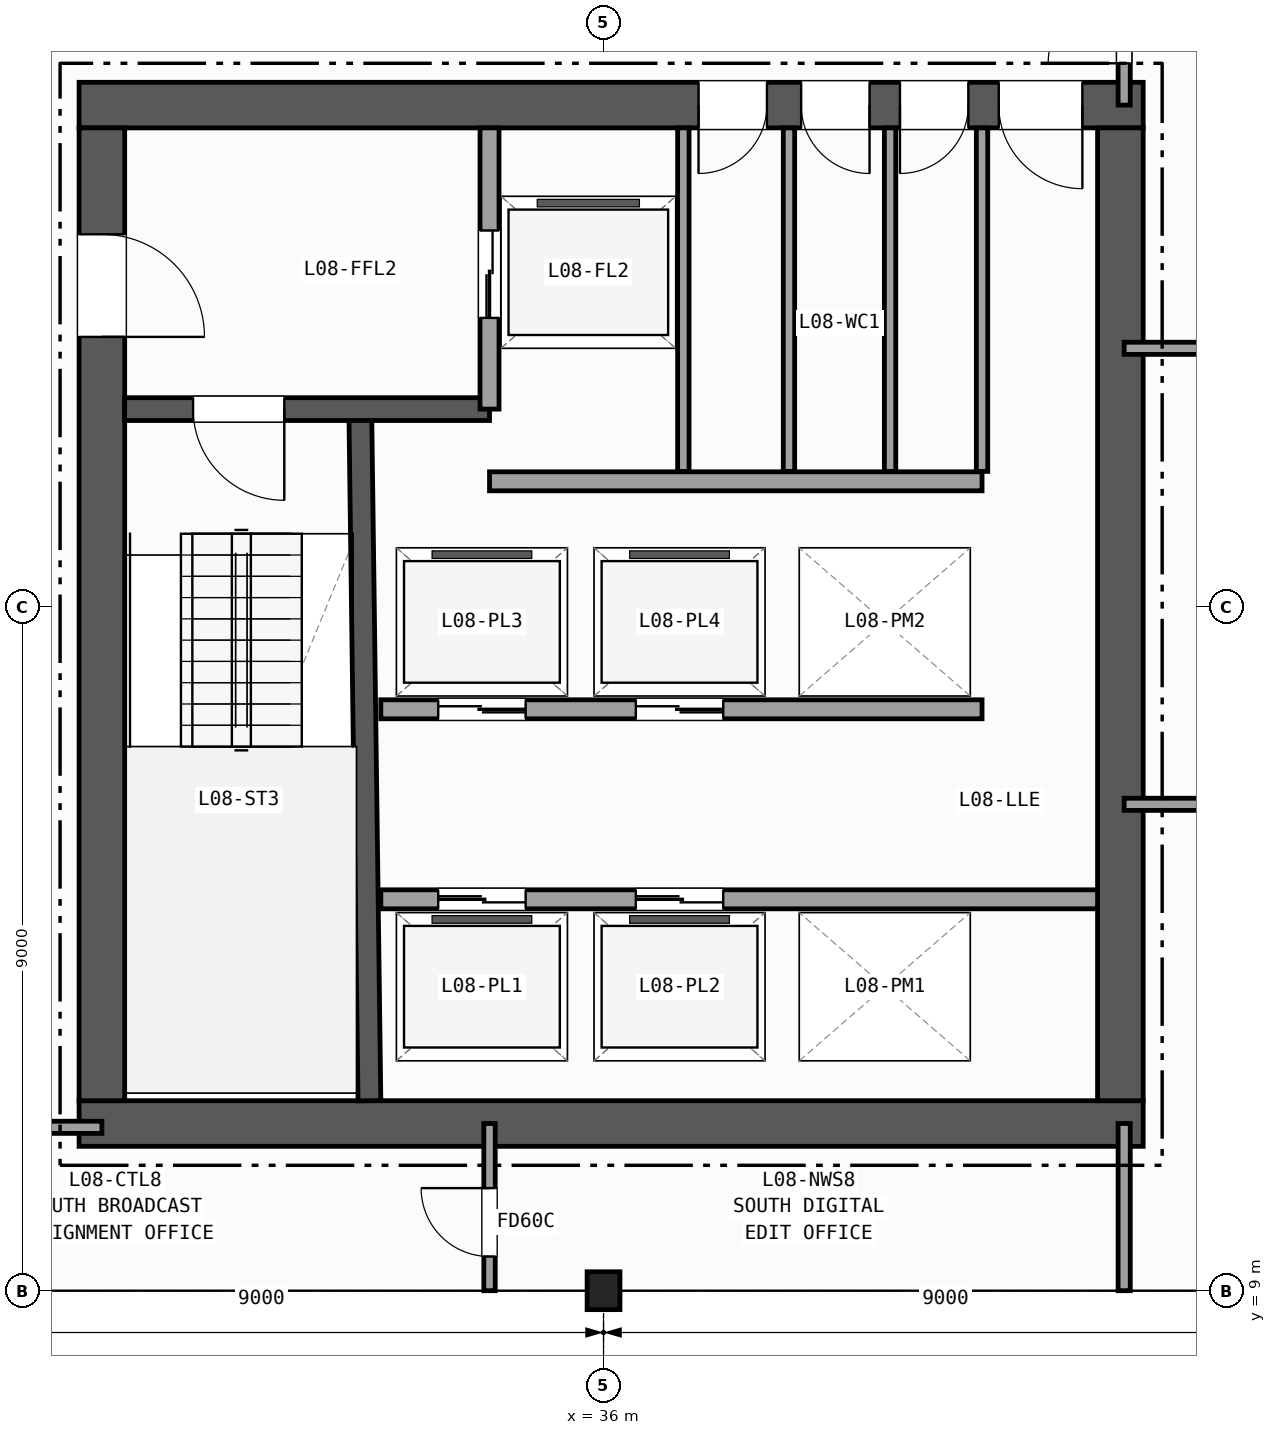
"""IFC4 building model, lengths in metres.
Left out: names, types, materials, properties, quantities, classifications, styles, units other than length and angle.
Written with IfcOpenShell. Run it as: python <this file> out.ifc"""

import sys

from ifc_helpers import new_model, si_unit, direction, frame, frame_2d, origin, origin_2d, place, context, subcontext, project, spatial, rectangle, i_section, extrude, element, fill, save


model = new_model("IFC4")
c1 = context("Model", 3, precision=1e-05, world=origin(), true_north=direction((0.0, 1.0)))
c2 = subcontext(c1, "Body", "Model", "MODEL_VIEW")
j1 = project(units=[si_unit("LENGTHUNIT", "METRE"), si_unit("PLANEANGLEUNIT", "RADIAN")], contexts=[c1])
p1 = place(None, origin())
s1 = spatial("IfcSite", under=j1, at=p1, CompositionType="ELEMENT")
p2 = place(p1, origin())
s2 = spatial("IfcBuilding", under=s1, at=p2, CompositionType="ELEMENT")
p3 = place(p2, frame((0.0, 0.0, 39.7)))
s3 = spatial("IfcBuildingStorey", under=s2, at=p3, CompositionType="ELEMENT", Elevation=39.7)
p4 = place(p3, frame((36.0, 9.0, 0.0), z_axis=(0.0, 0.0, 1.0), x_axis=(1.0, 0.0, 0.0)))
e1 = element("IfcColumn", 1, at=p4, inside=s3, PredefinedType="COLUMN", context=c2, shape_type="SweptSolid", body=[
    extrude(i_section(OverallWidth=0.432, OverallDepth=0.498, WebThickness=0.056, FlangeThickness=0.089, FilletRadius=0.015, at=origin_2d()), origin(), (0.0, 0.0, 1.0), 3.7),
])
p5 = place(p3, frame((29.1, 11.2, 0.0), z_axis=(0.0, 0.0, 1.0), x_axis=(1.0, 0.0, 0.0)))
e2 = element("IfcWall", 2, at=p5, inside=s3, PredefinedType="SHEAR", context=c2, shape_type="SweptSolid", body=[
    extrude(rectangle(XDim=14.0, YDim=0.6, at=frame_2d((7.0, 0.0))), origin(), (0.0, 0.0, 1.0), 3.42),
])
p6 = place(p3, frame((43.1, 24.6, 0.0), z_axis=(0.0, 0.0, 1.0), x_axis=(-1.0, 0.0, 0.0)))
e3 = element("IfcWall", 3, at=p6, inside=s3, PredefinedType="SHEAR", context=c2, shape_type="SweptSolid", body=[
    extrude(rectangle(XDim=14.0, YDim=0.6, at=frame_2d((7.0, 0.0))), origin(), (0.0, 0.0, 1.0), 3.42),
])
p7 = place(p6, frame((0.8, 0.0, 0.0)))
e4 = element("IfcOpeningElement", 4, at=p7, cuts=e3, PredefinedType="OPENING", context=c2, shape_type="SweptSolid", body=[
    extrude(rectangle(XDim=1.1, YDim=2.15, at=frame_2d((0.55, 1.075))), frame((0.0, 0.31, 0.0), z_axis=(0.0, -1.0, 0.0), x_axis=(1.0, 0.0, 0.0)), (0.0, 0.0, 1.0), 0.62),
])
p8 = place(p6, frame((2.3, 0.0, 0.0)))
e5 = element("IfcOpeningElement", 5, at=p8, cuts=e3, PredefinedType="OPENING", context=c2, shape_type="SweptSolid", body=[
    extrude(rectangle(XDim=0.9, YDim=2.1, at=frame_2d((0.45, 1.05))), frame((0.0, 0.31, 0.0), z_axis=(0.0, -1.0, 0.0), x_axis=(1.0, 0.0, 0.0)), (0.0, 0.0, 1.0), 0.62),
])
p9 = place(p6, frame((3.6, 0.0, 0.0)))
e6 = element("IfcOpeningElement", 6, at=p9, cuts=e3, PredefinedType="OPENING", context=c2, shape_type="SweptSolid", body=[
    extrude(rectangle(XDim=0.9, YDim=2.1, at=frame_2d((0.45, 1.05))), frame((0.0, 0.31, 0.0), z_axis=(0.0, -1.0, 0.0), x_axis=(1.0, 0.0, 0.0)), (0.0, 0.0, 1.0), 0.62),
])
p10 = place(p6, frame((4.95, 0.0, 0.0)))
e7 = element("IfcOpeningElement", 7, at=p10, cuts=e3, PredefinedType="OPENING", context=c2, shape_type="SweptSolid", body=[
    extrude(rectangle(XDim=0.9, YDim=2.1, at=frame_2d((0.45, 1.05))), frame((0.0, 0.31, 0.0), z_axis=(0.0, -1.0, 0.0), x_axis=(1.0, 0.0, 0.0)), (0.0, 0.0, 1.0), 0.62),
])
p11 = place(p3, frame((29.4, 24.3, 0.0), z_axis=(0.0, 0.0, 1.0), x_axis=(0.0, -1.0, 0.0)))
e8 = element("IfcWall", 8, at=p11, inside=s3, PredefinedType="SHEAR", context=c2, shape_type="SweptSolid", body=[
    extrude(rectangle(XDim=12.8, YDim=0.6, at=frame_2d((6.4, 0.0))), origin(), (0.0, 0.0, 1.0), 3.42),
])
p12 = place(p11, frame((1.4, 0.0, 0.0)))
e9 = element("IfcOpeningElement", 9, at=p12, cuts=e8, PredefinedType="OPENING", context=c2, shape_type="SweptSolid", body=[
    extrude(rectangle(XDim=1.35, YDim=2.15, at=frame_2d((0.675, 1.075))), frame((0.0, 0.31, 0.0), z_axis=(0.0, -1.0, 0.0), x_axis=(1.0, 0.0, 0.0)), (0.0, 0.0, 1.0), 0.62),
])
p13 = place(p3, frame((42.8, 11.5, 0.0), z_axis=(0.0, 0.0, 1.0), x_axis=(0.0, 1.0, 0.0)))
e10 = element("IfcWall", 10, at=p13, inside=s3, PredefinedType="SHEAR", context=c2, shape_type="SweptSolid", body=[
    extrude(rectangle(XDim=12.8, YDim=0.6, at=frame_2d((6.4, 0.0))), origin(), (0.0, 0.0, 1.0), 3.42),
])
p14 = place(p3, frame((32.92, 11.5, 0.0), z_axis=(0.0, 0.0, 1.0), x_axis=(-0.013244407292, 0.999912288991, 0.0)))
e11 = element("IfcWall", 11, at=p14, inside=s3, PredefinedType="SHEAR", context=c2, shape_type="SweptSolid", body=[
    extrude(rectangle(XDim=9.051, YDim=0.3, at=frame_2d((4.525, 0.0))), origin(), (0.0, 0.0, 1.0), 3.42),
])
p15 = place(p3, frame((34.5, 20.6, 0.0), z_axis=(0.0, 0.0, 1.0), x_axis=(-1.0, 0.0, 0.0)))
e12 = element("IfcWall", 12, at=p15, inside=s3, PredefinedType="SHEAR", context=c2, shape_type="SweptSolid", body=[
    extrude(rectangle(XDim=4.8, YDim=0.3, at=frame_2d((2.4, 0.0))), origin(), (0.0, 0.0, 1.0), 3.42),
])
p16 = place(p15, frame((2.7, 0.0, 0.0)))
e13 = element("IfcOpeningElement", 13, at=p16, cuts=e12, PredefinedType="OPENING", context=c2, shape_type="SweptSolid", body=[
    extrude(rectangle(XDim=1.2, YDim=2.15, at=frame_2d((0.6, 1.075))), frame((0.0, 0.16, 0.0), z_axis=(0.0, -1.0, 0.0), x_axis=(1.0, 0.0, 0.0)), (0.0, 0.0, 1.0), 0.32),
])
p17 = place(p3, frame((34.5, 20.6, 0.0), z_axis=(0.0, 0.0, 1.0), x_axis=(0.0, 1.0, 0.0)))
e14 = element("IfcWall", 14, at=p17, inside=s3, PredefinedType="PARTITIONING", context=c2, shape_type="SweptSolid", body=[
    extrude(rectangle(XDim=3.7, YDim=0.25, at=frame_2d((1.85, 0.0))), origin(), (0.0, 0.0, 1.0), 3.42),
])
p18 = place(p17, frame((1.2, 0.0, 0.0)))
e15 = element("IfcOpeningElement", 15, at=p18, cuts=e14, PredefinedType="OPENING", context=c2, shape_type="SweptSolid", body=[
    extrude(rectangle(XDim=1.15, YDim=2.15, at=frame_2d((0.575, 1.075))), frame((0.0, 0.135, 0.0), z_axis=(0.0, -1.0, 0.0), x_axis=(1.0, 0.0, 0.0)), (0.0, 0.0, 1.0), 0.27),
])
p19 = place(p3, frame((34.5, 19.65, 0.0), z_axis=(0.0, 0.0, 1.0), x_axis=(1.0, 0.0, 0.0)))
e16 = element("IfcWall", 16, at=p19, inside=s3, PredefinedType="PARTITIONING", context=c2, shape_type="SweptSolid", body=[
    extrude(rectangle(XDim=6.48, YDim=0.25, at=frame_2d((3.24, 0.0))), origin(), (0.0, 0.0, 1.0), 3.42),
])
p20 = place(p3, frame((33.07, 14.15, 0.0), z_axis=(0.0, 0.0, 1.0), x_axis=(1.0, 0.0, 0.0)))
e17 = element("IfcWall", 17, at=p20, inside=s3, PredefinedType="PARTITIONING", context=c2, shape_type="SweptSolid", body=[
    extrude(rectangle(XDim=9.43, YDim=0.25, at=frame_2d((4.715, 0.0))), origin(), (0.0, 0.0, 1.0), 3.42),
])
p21 = place(p20, frame((0.755, 0.0, 0.0)))
e18 = element("IfcOpeningElement", 18, at=p21, cuts=e17, PredefinedType="OPENING", context=c2, shape_type="SweptSolid", body=[
    extrude(rectangle(XDim=1.15, YDim=2.15, at=frame_2d((0.575, 1.075))), frame((0.0, 0.135, 0.0), z_axis=(0.0, -1.0, 0.0), x_axis=(1.0, 0.0, 0.0)), (0.0, 0.0, 1.0), 0.27),
])
p22 = place(p20, frame((3.355, 0.0, 0.0)))
e19 = element("IfcOpeningElement", 19, at=p22, cuts=e17, PredefinedType="OPENING", context=c2, shape_type="SweptSolid", body=[
    extrude(rectangle(XDim=1.15, YDim=2.15, at=frame_2d((0.575, 1.075))), frame((0.0, 0.135, 0.0), z_axis=(0.0, -1.0, 0.0), x_axis=(1.0, 0.0, 0.0)), (0.0, 0.0, 1.0), 0.27),
])
p23 = place(p3, frame((40.98, 16.65, 0.0), z_axis=(0.0, 0.0, 1.0), x_axis=(-1.0, 0.0, 0.0)))
e20 = element("IfcWall", 20, at=p23, inside=s3, PredefinedType="PARTITIONING", context=c2, shape_type="SweptSolid", body=[
    extrude(rectangle(XDim=7.91, YDim=0.25, at=frame_2d((3.955, 0.0))), origin(), (0.0, 0.0, 1.0), 3.42),
])
p24 = place(p23, frame((6.005, 0.0, 0.0)))
e21 = element("IfcOpeningElement", 21, at=p24, cuts=e20, PredefinedType="OPENING", context=c2, shape_type="SweptSolid", body=[
    extrude(rectangle(XDim=1.15, YDim=2.15, at=frame_2d((0.575, 1.075))), frame((0.0, 0.135, 0.0), z_axis=(0.0, -1.0, 0.0), x_axis=(1.0, 0.0, 0.0)), (0.0, 0.0, 1.0), 0.27),
])
p25 = place(p23, frame((3.405, 0.0, 0.0)))
e22 = element("IfcOpeningElement", 22, at=p25, cuts=e20, PredefinedType="OPENING", context=c2, shape_type="SweptSolid", body=[
    extrude(rectangle(XDim=1.15, YDim=2.15, at=frame_2d((0.575, 1.075))), frame((0.0, 0.135, 0.0), z_axis=(0.0, -1.0, 0.0), x_axis=(1.0, 0.0, 0.0)), (0.0, 0.0, 1.0), 0.27),
])
for number, where, z_axis, x_axis in (
    (23, (37.05, 19.78, 0.0), (0.0, 0.0, 1.0), (0.0, 1.0, 0.0)),
    (24, (38.44, 19.78, 0.0), (0.0, 0.0, 1.0), (0.0, 1.0, 0.0)),
    (25, (39.77, 19.78, 0.0), (0.0, 0.0, 1.0), (0.0, 1.0, 0.0)),
    (26, (40.98, 19.78, 0.0), (0.0, 0.0, 1.0), (0.0, 1.0, 0.0)),
):
    element("IfcWall", number, at=place(p3, frame(where, z_axis=z_axis, x_axis=x_axis)), inside=s3, PredefinedType="PARTITIONING", context=c2, shape_type="SweptSolid", body=[
        extrude(rectangle(XDim=4.52, YDim=0.15, at=frame_2d((2.26, 0.0))), origin(), (0.0, 0.0, 1.0), 3.42),
    ])
p26 = place(p3, frame((24.65, 11.15, 0.0), z_axis=(0.0, 0.0, 1.0), x_axis=(1.0, 0.0, 0.0)))
e27 = element("IfcWall", 27, at=p26, inside=s3, PredefinedType="PARTITIONING", context=c2, shape_type="SweptSolid", body=[
    extrude(rectangle(XDim=4.75, YDim=0.16, at=frame_2d((2.375, 0.0))), origin(), (0.0, 0.0, 1.0), 2.792),
])
p27 = place(p26, frame((1.2, 0.0, 0.0)))
e28 = element("IfcOpeningElement", 28, at=p27, cuts=e27, PredefinedType="OPENING", context=c2, shape_type="SweptSolid", body=[
    extrude(rectangle(XDim=0.86, YDim=2.05, at=frame_2d((0.43, 1.025))), frame((0.0, 0.09, 0.0), z_axis=(0.0, -1.0, 0.0), x_axis=(1.0, 0.0, 0.0)), (0.0, 0.0, 1.0), 0.18),
])
p28 = place(p3, frame((34.5, 9.0, 0.0), z_axis=(0.0, 0.0, 1.0), x_axis=(0.0, 1.0, 0.0)))
e29 = element("IfcWall", 29, at=p28, inside=s3, PredefinedType="PARTITIONING", context=c2, shape_type="SweptSolid", body=[
    extrude(rectangle(XDim=2.2, YDim=0.15, at=frame_2d((1.1, 0.0))), origin(), (0.0, 0.0, 1.0), 2.627),
])
p29 = place(p28, frame((0.45, 0.0, 0.0)))
e30 = element("IfcOpeningElement", 30, at=p29, cuts=e29, PredefinedType="OPENING", context=c2, shape_type="SweptSolid", body=[
    extrude(rectangle(XDim=0.9, YDim=2.1, at=frame_2d((0.45, 1.05))), frame((0.0, 0.085, 0.0), z_axis=(0.0, -1.0, 0.0), x_axis=(1.0, 0.0, 0.0)), (0.0, 0.0, 1.0), 0.17),
])
p30 = place(p3, frame((42.85, 9.0, 0.0), z_axis=(0.0, 0.0, 1.0), x_axis=(0.0, 1.0, 0.0)))
e31 = element("IfcWall", 31, at=p30, inside=s3, PredefinedType="PARTITIONING", context=c2, shape_type="SweptSolid", body=[
    extrude(rectangle(XDim=2.2, YDim=0.16, at=frame_2d((1.1, 0.0))), origin(), (0.0, 0.0, 1.0), 2.627),
])
p31 = place(p3, frame((42.85, 24.6, 0.0), z_axis=(0.0, 0.0, 1.0), x_axis=(0.0, 1.0, 0.0)))
e32 = element("IfcWall", 32, at=p31, inside=s3, PredefinedType="PARTITIONING", context=c2, shape_type="SweptSolid", body=[
    extrude(rectangle(XDim=2.4, YDim=0.16, at=frame_2d((1.2, 0.0))), origin(), (0.0, 0.0, 1.0), 2.627),
])
p32 = place(p31, frame((0.55, 0.0, 0.0)))
e33 = element("IfcOpeningElement", 33, at=p32, cuts=e32, PredefinedType="OPENING", context=c2, shape_type="SweptSolid", body=[
    extrude(rectangle(XDim=1.0, YDim=2.1, at=frame_2d((0.5, 1.05))), frame((0.0, 0.09, 0.0), z_axis=(0.0, -1.0, 0.0), x_axis=(1.0, 0.0, 0.0)), (0.0, 0.0, 1.0), 0.18),
])
p33 = place(p3, frame((42.85, 15.4, 0.0), z_axis=(0.0, 0.0, 1.0), x_axis=(1.0, 0.0, 0.0)))
e34 = element("IfcWall", 34, at=p33, inside=s3, PredefinedType="PARTITIONING", context=c2, shape_type="SweptSolid", body=[
    extrude(rectangle(XDim=20.582, YDim=0.16, at=frame_2d((10.291, 0.0))), origin(), (0.0, 0.0, 1.0), 3.42),
])
p34 = place(p33, frame((3.4, 0.0, 0.0)))
e35 = element("IfcOpeningElement", 35, at=p34, cuts=e34, PredefinedType="OPENING", context=c2, shape_type="SweptSolid", body=[
    extrude(rectangle(XDim=1.05, YDim=2.15, at=frame_2d((0.525, 1.075))), frame((0.0, 0.09, 0.0), z_axis=(0.0, -1.0, 0.0), x_axis=(1.0, 0.0, 0.0)), (0.0, 0.0, 1.0), 0.18),
])
p35 = place(p3, frame((42.85, 21.4, 0.0), z_axis=(0.0, 0.0, 1.0), x_axis=(1.0, 0.0, 0.0)))
e36 = element("IfcWall", 36, at=p35, inside=s3, PredefinedType="PARTITIONING", context=c2, shape_type="SweptSolid", body=[
    extrude(rectangle(XDim=20.5, YDim=0.16, at=frame_2d((10.25, 0.0))), origin(), (0.0, 0.0, 1.0), 3.42),
])
p36 = place(p35, frame((3.4, 0.0, 0.0)))
e37 = element("IfcOpeningElement", 37, at=p36, cuts=e36, PredefinedType="OPENING", context=c2, shape_type="SweptSolid", body=[
    extrude(rectangle(XDim=1.2, YDim=2.15, at=frame_2d((0.6, 1.075))), frame((0.0, 0.09, 0.0), z_axis=(0.0, -1.0, 0.0), x_axis=(1.0, 0.0, 0.0)), (0.0, 0.0, 1.0), 0.18),
])
p37 = place(p16, origin())
e38 = element("IfcDoor", 38, at=p37, inside=s3, OperationType="SINGLE_SWING_LEFT", PredefinedType="DOOR", context=c2, shape_type="SweptSolid", body=[
    extrude(rectangle(XDim=1.2, YDim=2.15, at=frame_2d((0.6, 1.075))), frame((0.0, 0.025, 0.0), z_axis=(0.0, -1.0, 0.0), x_axis=(1.0, 0.0, 0.0)), (0.0, 0.0, 1.0), 0.05),
])
fill(e13, e38)
p38 = place(p12, origin())
e39 = element("IfcDoor", 39, at=p38, inside=s3, OperationType="SINGLE_SWING_RIGHT", PredefinedType="DOOR", context=c2, shape_type="SweptSolid", body=[
    extrude(rectangle(XDim=1.35, YDim=2.15, at=frame_2d((0.675, 1.075))), frame((0.0, 0.025, 0.0), z_axis=(0.0, -1.0, 0.0), x_axis=(1.0, 0.0, 0.0)), (0.0, 0.0, 1.0), 0.05),
])
fill(e9, e39)
p39 = place(p7, origin())
e40 = element("IfcDoor", 40, at=p39, inside=s3, OperationType="SINGLE_SWING_LEFT", PredefinedType="DOOR", context=c2, shape_type="SweptSolid", body=[
    extrude(rectangle(XDim=1.1, YDim=2.15, at=frame_2d((0.55, 1.075))), frame((0.0, 0.025, 0.0), z_axis=(0.0, -1.0, 0.0), x_axis=(1.0, 0.0, 0.0)), (0.0, 0.0, 1.0), 0.05),
])
fill(e4, e40)
p40 = place(p8, origin())
e41 = element("IfcDoor", 41, at=p40, inside=s3, OperationType="SINGLE_SWING_RIGHT", PredefinedType="DOOR", context=c2, shape_type="SweptSolid", body=[
    extrude(rectangle(XDim=0.9, YDim=2.1, at=frame_2d((0.45, 1.05))), frame((0.0, 0.025, 0.0), z_axis=(0.0, -1.0, 0.0), x_axis=(1.0, 0.0, 0.0)), (0.0, 0.0, 1.0), 0.05),
])
fill(e5, e41)
p41 = place(p9, origin())
e42 = element("IfcDoor", 42, at=p41, inside=s3, OperationType="SINGLE_SWING_LEFT", PredefinedType="DOOR", context=c2, shape_type="SweptSolid", body=[
    extrude(rectangle(XDim=0.9, YDim=2.1, at=frame_2d((0.45, 1.05))), frame((0.0, 0.025, 0.0), z_axis=(0.0, -1.0, 0.0), x_axis=(1.0, 0.0, 0.0)), (0.0, 0.0, 1.0), 0.05),
])
fill(e6, e42)
p42 = place(p10, origin())
e43 = element("IfcDoor", 43, at=p42, inside=s3, OperationType="SINGLE_SWING_RIGHT", PredefinedType="DOOR", context=c2, shape_type="SweptSolid", body=[
    extrude(rectangle(XDim=0.9, YDim=2.1, at=frame_2d((0.45, 1.05))), frame((0.0, 0.025, 0.0), z_axis=(0.0, -1.0, 0.0), x_axis=(1.0, 0.0, 0.0)), (0.0, 0.0, 1.0), 0.05),
])
fill(e7, e43)
p43 = place(p18, origin())
e44 = element("IfcDoor", 44, at=p43, inside=s3, OperationType="DOUBLE_DOOR_SLIDING", PredefinedType="DOOR", context=c2, shape_type="SweptSolid", body=[
    extrude(rectangle(XDim=1.15, YDim=2.15, at=frame_2d((0.575, 1.075))), frame((0.0, 0.025, 0.0), z_axis=(0.0, -1.0, 0.0), x_axis=(1.0, 0.0, 0.0)), (0.0, 0.0, 1.0), 0.05),
])
fill(e15, e44)
p44 = place(p21, origin())
e45 = element("IfcDoor", 45, at=p44, inside=s3, OperationType="DOUBLE_DOOR_SLIDING", PredefinedType="DOOR", context=c2, shape_type="SweptSolid", body=[
    extrude(rectangle(XDim=1.15, YDim=2.15, at=frame_2d((0.575, 1.075))), frame((0.0, 0.025, 0.0), z_axis=(0.0, -1.0, 0.0), x_axis=(1.0, 0.0, 0.0)), (0.0, 0.0, 1.0), 0.05),
])
fill(e18, e45)
p45 = place(p22, origin())
e46 = element("IfcDoor", 46, at=p45, inside=s3, OperationType="DOUBLE_DOOR_SLIDING", PredefinedType="DOOR", context=c2, shape_type="SweptSolid", body=[
    extrude(rectangle(XDim=1.15, YDim=2.15, at=frame_2d((0.575, 1.075))), frame((0.0, 0.025, 0.0), z_axis=(0.0, -1.0, 0.0), x_axis=(1.0, 0.0, 0.0)), (0.0, 0.0, 1.0), 0.05),
])
fill(e19, e46)
p46 = place(p24, origin())
e47 = element("IfcDoor", 47, at=p46, inside=s3, OperationType="DOUBLE_DOOR_SLIDING", PredefinedType="DOOR", context=c2, shape_type="SweptSolid", body=[
    extrude(rectangle(XDim=1.15, YDim=2.15, at=frame_2d((0.575, 1.075))), frame((0.0, 0.025, 0.0), z_axis=(0.0, -1.0, 0.0), x_axis=(1.0, 0.0, 0.0)), (0.0, 0.0, 1.0), 0.05),
])
fill(e21, e47)
p47 = place(p25, origin())
e48 = element("IfcDoor", 48, at=p47, inside=s3, OperationType="DOUBLE_DOOR_SLIDING", PredefinedType="DOOR", context=c2, shape_type="SweptSolid", body=[
    extrude(rectangle(XDim=1.15, YDim=2.15, at=frame_2d((0.575, 1.075))), frame((0.0, 0.025, 0.0), z_axis=(0.0, -1.0, 0.0), x_axis=(1.0, 0.0, 0.0)), (0.0, 0.0, 1.0), 0.05),
])
fill(e22, e48)
p48 = place(p29, origin())
e49 = element("IfcDoor", 49, at=p48, inside=s3, OperationType="SINGLE_SWING_RIGHT", PredefinedType="DOOR", context=c2, shape_type="SweptSolid", body=[
    extrude(rectangle(XDim=0.9, YDim=2.1, at=frame_2d((0.45, 1.05))), frame((0.0, 0.025, 0.0), z_axis=(0.0, -1.0, 0.0), x_axis=(1.0, 0.0, 0.0)), (0.0, 0.0, 1.0), 0.05),
])
fill(e30, e49)
p49 = place(p32, origin())
e50 = element("IfcDoor", 50, at=p49, inside=s3, OperationType="SINGLE_SWING_LEFT", PredefinedType="DOOR", context=c2, shape_type="SweptSolid", body=[
    extrude(rectangle(XDim=1.0, YDim=2.1, at=frame_2d((0.5, 1.05))), frame((0.0, 0.025, 0.0), z_axis=(0.0, -1.0, 0.0), x_axis=(1.0, 0.0, 0.0)), (0.0, 0.0, 1.0), 0.05),
])
fill(e33, e50)
save(model, sys.argv[1])
